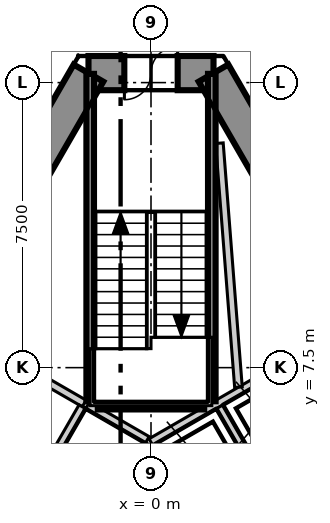
"""IFC4 building model, lengths in metres.
Left out: names, types, materials, properties, quantities, classifications, styles, units other than length and angle.
Written with IfcOpenShell. Run it as: python <this file> out.ifc"""

import sys

from ifc_helpers import new_model, si_unit, direction, frame, frame_2d, origin, place, context, subcontext, project, spatial, polyline, rectangle, outline, extrude, element, fill, save


model = new_model("IFC4")
c1 = context("Model", 3, precision=1e-05, world=origin(), true_north=direction((0.0, 1.0)))
c2 = subcontext(c1, "Body", "Model", "MODEL_VIEW")
j1 = project(units=[si_unit("LENGTHUNIT", "METRE"), si_unit("PLANEANGLEUNIT", "RADIAN")], contexts=[c1])
p1 = place(None, origin())
s1 = spatial("IfcSite", under=j1, at=p1, CompositionType="ELEMENT")
p2 = place(p1, origin())
s2 = spatial("IfcBuilding", under=s1, at=p2, CompositionType="ELEMENT")
p3 = place(p2, frame((0.0, 0.0, 59.3)))
s3 = spatial("IfcBuildingStorey", under=s2, at=p3, CompositionType="ELEMENT", Elevation=59.3)
p4 = place(p3, frame((1.645, 15.25, -0.3), z_axis=(0.0, 0.0, 1.0), x_axis=(-1.0, 0.0, 0.0)))
e1 = element("IfcWall", 1, at=p4, inside=s3, PredefinedType="SHEAR", context=c2, shape_type="SweptSolid", body=[
    extrude(outline(polyline([(-0.26, -0.45), (1.645, -0.45), (3.55, -0.45), (3.031, 0.45), (1.645, 0.45), (0.259, 0.45), (-0.26, -0.45)])), origin(), (0.0, 0.0, 1.0), 4.0),
])
p5 = place(p4, frame((0.945, 0.0, 0.3)))
e2 = element("IfcOpeningElement", 2, at=p5, cuts=e1, PredefinedType="OPENING", context=c2, shape_type="SweptSolid", body=[
    extrude(rectangle(XDim=1.4, YDim=2.1, at=frame_2d((0.7, 1.05))), frame((0.0, 0.46, 0.0), z_axis=(0.0, -1.0, 0.0), x_axis=(1.0, 0.0, 0.0)), (0.0, 0.0, 1.0), 0.92),
])
p6 = place(p3, frame((-1.645, 15.25, -0.3), z_axis=(0.0, 0.0, 1.0), x_axis=(-0.500026485275, -0.866010111964, 0.0)))
e3 = element("IfcWall", 3, at=p6, inside=s3, PredefinedType="SHEAR", context=c2, shape_type="SweptSolid", body=[
    extrude(outline(polyline([(-0.26, -0.45), (1.685, -0.45), (3.63, -0.45), (5.576, -0.45), (7.521, -0.45), (9.466, -0.449), (11.411, -0.449), (13.357, -0.449), (15.302, -0.449), (17.247, -0.449), (19.192, -0.449), (21.138, -0.449), (23.083, -0.449), (25.028, -0.449), (24.509, 0.45), (22.644, 0.45), (20.778, 0.45), (18.913, 0.45), (17.048, 0.45), (15.182, 0.449), (13.317, 0.449), (11.452, 0.449), (9.587, 0.449), (7.721, 0.449), (5.856, 0.449), (3.991, 0.449), (2.125, 0.449), (0.26, 0.449), (-0.26, -0.45)])), origin(), (0.0, 0.0, 1.0), 4.0),
])
p7 = place(p6, frame((11.834, 0.0, 0.3)))
e4 = element("IfcOpeningElement", 4, at=p7, cuts=e3, PredefinedType="OPENING", context=c2, shape_type="SweptSolid", body=[
    extrude(rectangle(XDim=1.1, YDim=2.1, at=frame_2d((0.55, 1.05))), frame((0.0, 0.46, 0.0), z_axis=(0.0, -1.0, 0.0), x_axis=(1.0, 0.0, 0.0)), (0.0, 0.0, 1.0), 0.92),
])
p8 = place(p6, frame((18.976, 0.0, 0.3)))
e5 = element("IfcOpeningElement", 5, at=p8, cuts=e3, PredefinedType="OPENING", context=c2, shape_type="SweptSolid", body=[
    extrude(rectangle(XDim=0.9, YDim=2.1, at=frame_2d((0.45, 1.05))), frame((0.0, 0.46, 0.0), z_axis=(0.0, -1.0, 0.0), x_axis=(1.0, 0.0, 0.0)), (0.0, 0.0, 1.0), 0.92),
])
p9 = place(p6, frame((4.892, 0.0, 0.3)))
e6 = element("IfcOpeningElement", 6, at=p9, cuts=e3, PredefinedType="OPENING", context=c2, shape_type="SweptSolid", body=[
    extrude(rectangle(XDim=0.9, YDim=2.1, at=frame_2d((0.45, 1.05))), frame((0.0, 0.46, 0.0), z_axis=(0.0, -1.0, 0.0), x_axis=(1.0, 0.0, 0.0)), (0.0, 0.0, 1.0), 0.92),
])
p10 = place(p3, frame((14.03, -6.2, -0.3), z_axis=(0.0, 0.0, 1.0), x_axis=(-0.500026485275, 0.866010111964, 0.0)))
e7 = element("IfcWall", 7, at=p10, inside=s3, PredefinedType="SHEAR", context=c2, shape_type="SweptSolid", body=[
    extrude(outline(polyline([(-0.26, -0.449), (1.685, -0.449), (3.63, -0.449), (5.576, -0.449), (7.521, -0.449), (9.466, -0.449), (11.411, -0.449), (13.357, -0.449), (15.302, -0.449), (17.247, -0.45), (19.192, -0.45), (21.138, -0.45), (23.083, -0.45), (25.028, -0.45), (24.509, 0.449), (22.644, 0.449), (20.778, 0.449), (18.913, 0.449), (17.048, 0.449), (15.182, 0.449), (13.317, 0.449), (11.452, 0.449), (9.587, 0.449), (7.721, 0.45), (5.856, 0.45), (3.991, 0.45), (2.125, 0.45), (0.26, 0.45), (-0.26, -0.449)])), origin(), (0.0, 0.0, 1.0), 4.0),
])
p11 = place(p10, frame((11.484, 0.0, 0.3)))
e8 = element("IfcOpeningElement", 8, at=p11, cuts=e7, PredefinedType="OPENING", context=c2, shape_type="SweptSolid", body=[
    extrude(rectangle(XDim=1.8, YDim=2.1, at=frame_2d((0.9, 1.05))), frame((0.0, 0.46, 0.0), z_axis=(0.0, -1.0, 0.0), x_axis=(1.0, 0.0, 0.0)), (0.0, 0.0, 1.0), 0.92),
])
p12 = place(p10, frame((18.914, 0.0, 0.3)))
e9 = element("IfcOpeningElement", 9, at=p12, cuts=e7, PredefinedType="OPENING", context=c2, shape_type="SweptSolid", body=[
    extrude(rectangle(XDim=1.0, YDim=2.1, at=frame_2d((0.5, 1.05))), frame((0.0, 0.46, 0.0), z_axis=(0.0, -1.0, 0.0), x_axis=(1.0, 0.0, 0.0)), (0.0, 0.0, 1.0), 0.92),
])
p13 = place(p3, frame((-19.497, -11.17, 0.0), z_axis=(0.0, 0.0, 1.0), x_axis=(0.499998854553, 0.866026065108, 0.0)))
e10 = element("IfcWall", 10, at=p13, inside=s3, PredefinedType="PARTITIONING", context=c2, shape_type="SweptSolid", body=[
    extrude(rectangle(XDim=38.994, YDim=0.15, at=frame_2d((19.497, 0.0))), origin(), (0.0, 0.0, 1.0), 3.7),
])
p14 = place(p13, frame((36.044, 0.0, 0.0)))
e11 = element("IfcOpeningElement", 11, at=p14, cuts=e10, PredefinedType="OPENING", context=c2, shape_type="SweptSolid", body=[
    extrude(rectangle(XDim=1.1, YDim=2.1, at=frame_2d((0.55, 1.05))), frame((0.0, 0.085, 0.0), z_axis=(0.0, -1.0, 0.0), x_axis=(1.0, 0.0, 0.0)), (0.0, 0.0, 1.0), 0.17),
])
p15 = place(p13, frame((21.855, 0.0, 0.0)))
e12 = element("IfcOpeningElement", 12, at=p15, cuts=e10, PredefinedType="OPENING", context=c2, shape_type="SweptSolid", body=[
    extrude(rectangle(XDim=1.1, YDim=2.1, at=frame_2d((0.55, 1.05))), frame((0.0, 0.085, 0.0), z_axis=(0.0, -1.0, 0.0), x_axis=(1.0, 0.0, 0.0)), (0.0, 0.0, 1.0), 0.17),
])
p16 = place(p13, frame((32.155, 0.0, 0.0)))
e13 = element("IfcOpeningElement", 13, at=p16, cuts=e10, PredefinedType="OPENING", context=c2, shape_type="SweptSolid", body=[
    extrude(rectangle(XDim=0.9, YDim=2.1, at=frame_2d((0.45, 1.05))), frame((0.0, 0.085, 0.0), z_axis=(0.0, -1.0, 0.0), x_axis=(1.0, 0.0, 0.0)), (0.0, 0.0, 1.0), 0.17),
])
p17 = place(p13, frame((28.955, 0.0, 0.0)))
e14 = element("IfcOpeningElement", 14, at=p17, cuts=e10, PredefinedType="OPENING", context=c2, shape_type="SweptSolid", body=[
    extrude(rectangle(XDim=0.9, YDim=2.1, at=frame_2d((0.45, 1.05))), frame((0.0, 0.085, 0.0), z_axis=(0.0, -1.0, 0.0), x_axis=(1.0, 0.0, 0.0)), (0.0, 0.0, 1.0), 0.17),
])
p18 = place(p13, frame((26.055, 0.0, 0.0)))
e15 = element("IfcOpeningElement", 15, at=p18, cuts=e10, PredefinedType="OPENING", context=c2, shape_type="SweptSolid", body=[
    extrude(rectangle(XDim=1.0, YDim=2.1, at=frame_2d((0.5, 1.05))), frame((0.0, 0.085, 0.0), z_axis=(0.0, -1.0, 0.0), x_axis=(1.0, 0.0, 0.0)), (0.0, 0.0, 1.0), 0.17),
])
p19 = place(p13, frame((10.373, 0.0, 0.0)))
e16 = element("IfcOpeningElement", 16, at=p19, cuts=e10, PredefinedType="OPENING", context=c2, shape_type="SweptSolid", body=[
    extrude(rectangle(XDim=1.0, YDim=2.1, at=frame_2d((0.5, 1.05))), frame((0.0, 0.085, 0.0), z_axis=(0.0, -1.0, 0.0), x_axis=(1.0, 0.0, 0.0)), (0.0, 0.0, 1.0), 0.17),
])
p20 = place(p13, frame((17.773, 0.0, 0.0)))
e17 = element("IfcOpeningElement", 17, at=p20, cuts=e10, PredefinedType="OPENING", context=c2, shape_type="SweptSolid", body=[
    extrude(rectangle(XDim=0.9, YDim=2.1, at=frame_2d((0.45, 1.05))), frame((0.0, 0.085, 0.0), z_axis=(0.0, -1.0, 0.0), x_axis=(1.0, 0.0, 0.0)), (0.0, 0.0, 1.0), 0.17),
])
p21 = place(p13, frame((1.689, 0.0, 0.0)))
e18 = element("IfcOpeningElement", 18, at=p21, cuts=e10, PredefinedType="OPENING", context=c2, shape_type="SweptSolid", body=[
    extrude(rectangle(XDim=1.1, YDim=2.1, at=frame_2d((0.55, 1.05))), frame((0.0, 0.085, 0.0), z_axis=(0.0, -1.0, 0.0), x_axis=(1.0, 0.0, 0.0)), (0.0, 0.0, 1.0), 0.17),
])
p22 = place(p3, frame((0.075, 22.47, 0.0), z_axis=(0.0, 0.0, 1.0), x_axis=(0.500002280369, -0.866024087209, 0.0)))
e19 = element("IfcWall", 19, at=p22, inside=s3, PredefinedType="PARTITIONING", context=c2, shape_type="SweptSolid", body=[
    extrude(rectangle(XDim=38.844, YDim=0.15, at=frame_2d((19.422, 0.0))), origin(), (0.0, 0.0, 1.0), 3.7),
])
p23 = place(p22, frame((36.044, 0.0, 0.0)))
e20 = element("IfcOpeningElement", 20, at=p23, cuts=e19, PredefinedType="OPENING", context=c2, shape_type="SweptSolid", body=[
    extrude(rectangle(XDim=1.1, YDim=2.1, at=frame_2d((0.55, 1.05))), frame((0.0, 0.085, 0.0), z_axis=(0.0, -1.0, 0.0), x_axis=(1.0, 0.0, 0.0)), (0.0, 0.0, 1.0), 0.17),
])
p24 = place(p22, frame((26.255, 0.0, 0.0)))
e21 = element("IfcOpeningElement", 21, at=p24, cuts=e19, PredefinedType="OPENING", context=c2, shape_type="SweptSolid", body=[
    extrude(rectangle(XDim=1.1, YDim=2.1, at=frame_2d((0.55, 1.05))), frame((0.0, 0.085, 0.0), z_axis=(0.0, -1.0, 0.0), x_axis=(1.0, 0.0, 0.0)), (0.0, 0.0, 1.0), 0.17),
])
p25 = place(p22, frame((9.173, 0.0, 0.0)))
e22 = element("IfcOpeningElement", 22, at=p25, cuts=e19, PredefinedType="OPENING", context=c2, shape_type="SweptSolid", body=[
    extrude(rectangle(XDim=1.1, YDim=2.1, at=frame_2d((0.55, 1.05))), frame((0.0, 0.085, 0.0), z_axis=(0.0, -1.0, 0.0), x_axis=(1.0, 0.0, 0.0)), (0.0, 0.0, 1.0), 0.17),
])
p26 = place(p22, frame((17.373, 0.0, 0.0)))
e23 = element("IfcOpeningElement", 23, at=p26, cuts=e19, PredefinedType="OPENING", context=c2, shape_type="SweptSolid", body=[
    extrude(rectangle(XDim=0.9, YDim=2.1, at=frame_2d((0.45, 1.05))), frame((0.0, 0.085, 0.0), z_axis=(0.0, -1.0, 0.0), x_axis=(1.0, 0.0, 0.0)), (0.0, 0.0, 1.0), 0.17),
])
p27 = place(p22, frame((14.173, 0.0, 0.0)))
e24 = element("IfcOpeningElement", 24, at=p27, cuts=e19, PredefinedType="OPENING", context=c2, shape_type="SweptSolid", body=[
    extrude(rectangle(XDim=0.9, YDim=2.1, at=frame_2d((0.45, 1.05))), frame((0.0, 0.085, 0.0), z_axis=(0.0, -1.0, 0.0), x_axis=(1.0, 0.0, 0.0)), (0.0, 0.0, 1.0), 0.17),
])
p28 = place(p22, frame((11.273, 0.0, 0.0)))
e25 = element("IfcOpeningElement", 25, at=p28, cuts=e19, PredefinedType="OPENING", context=c2, shape_type="SweptSolid", body=[
    extrude(rectangle(XDim=1.0, YDim=2.1, at=frame_2d((0.5, 1.05))), frame((0.0, 0.085, 0.0), z_axis=(0.0, -1.0, 0.0), x_axis=(1.0, 0.0, 0.0)), (0.0, 0.0, 1.0), 0.17),
])
p29 = place(p22, frame((1.689, 0.0, 0.0)))
e26 = element("IfcOpeningElement", 26, at=p29, cuts=e19, PredefinedType="OPENING", context=c2, shape_type="SweptSolid", body=[
    extrude(rectangle(XDim=1.1, YDim=2.1, at=frame_2d((0.55, 1.05))), frame((0.0, 0.085, 0.0), z_axis=(0.0, -1.0, 0.0), x_axis=(1.0, 0.0, 0.0)), (0.0, 0.0, 1.0), 0.17),
])
p30 = place(p3, frame((-0.002, 5.541, 0.0), z_axis=(0.0, 0.0, 1.0), x_axis=(0.86600155993, 0.500041296494, 0.0)))
e27 = element("IfcWall", 27, at=p30, inside=s3, PredefinedType="SOLIDWALL", context=c2, shape_type="SweptSolid", body=[
    extrude(rectangle(XDim=4.132, YDim=0.2, at=frame_2d((2.066, 0.0))), origin(), (0.0, 0.0, 1.0), 3.7),
])
p31 = place(p3, frame((1.578, 2.874, 0.0), z_axis=(0.0, 0.0, 1.0), x_axis=(0.866031483044, 0.499989470266, 0.0)))
e28 = element("IfcWall", 28, at=p31, inside=s3, PredefinedType="SOLIDWALL", context=c2, shape_type="SweptSolid", body=[
    extrude(rectangle(XDim=6.226, YDim=0.2, at=frame_2d((3.113, 0.0))), origin(), (0.0, 0.0, 1.0), 3.7),
])
p32 = place(p31, frame((2.496, 0.0, 0.0)))
e29 = element("IfcOpeningElement", 29, at=p32, cuts=e28, PredefinedType="OPENING", context=c2, shape_type="SweptSolid", body=[
    extrude(rectangle(XDim=1.1, YDim=2.1, at=frame_2d((0.55, 1.05))), frame((0.0, 0.11, 0.0), z_axis=(0.0, -1.0, 0.0), x_axis=(1.0, 0.0, 0.0)), (0.0, 0.0, 1.0), 0.22),
])
p33 = place(p3, frame((1.807, 6.47, 0.0), z_axis=(0.0, 0.0, 1.0), x_axis=(0.50012328804, -0.865954211699, 0.0)))
e30 = element("IfcWall", 30, at=p33, inside=s3, PredefinedType="SOLIDWALL", context=c2, shape_type="SweptSolid", body=[
    extrude(rectangle(XDim=2.9, YDim=0.2, at=frame_2d((1.45, 0.0))), origin(), (0.0, 0.0, 1.0), 3.7),
])
p34 = place(p3, frame((-3.489, 7.557, 0.0), z_axis=(0.0, 0.0, 1.0), x_axis=(0.866010750942, -0.50002537861, 0.0)))
e31 = element("IfcWall", 31, at=p34, inside=s3, PredefinedType="SOLIDWALL", context=c2, shape_type="SweptSolid", body=[
    extrude(rectangle(XDim=2.0, YDim=0.2, at=frame_2d((1.0, 0.0))), origin(), (0.0, 0.0, 1.0), 3.7),
])
p35 = place(p3, frame((-3.257, 3.959, 0.0), z_axis=(0.0, 0.0, 1.0), x_axis=(0.50012328804, 0.865954211699, 0.0)))
e32 = element("IfcWall", 32, at=p35, inside=s3, PredefinedType="SOLIDWALL", context=c2, shape_type="SweptSolid", body=[
    extrude(rectangle(XDim=2.9, YDim=0.2, at=frame_2d((1.45, 0.0))), origin(), (0.0, 0.0, 1.0), 3.7),
])
p36 = place(p3, frame((-1.67, 6.507, 0.0), z_axis=(0.0, 0.0, 1.0), x_axis=(0.865941441609, -0.500145398563, 0.0)))
e33 = element("IfcWall", 33, at=p36, inside=s3, PredefinedType="SOLIDWALL", context=c2, shape_type="SweptSolid", body=[
    extrude(rectangle(XDim=1.815, YDim=0.2, at=frame_2d((0.908, 0.0))), origin(), (0.0, 0.0, 1.0), 3.7),
])
p37 = place(p3, frame((1.8, 13.406, 0.0), z_axis=(0.0, 0.0, 1.0), x_axis=(0.077809933421, -0.996968211259, 0.0)))
e34 = element("IfcWall", 34, at=p37, inside=s3, PredefinedType="SOLIDWALL", context=c2, shape_type="SweptSolid", body=[
    extrude(rectangle(XDim=6.438, YDim=0.2, at=frame_2d((3.219, 0.0))), origin(), (0.0, 0.0, 1.0), 3.7),
])
p38 = place(p3, frame((1.6, 6.615, 0.0), z_axis=(0.0, 0.0, 1.0), x_axis=(0.0, 1.0, 0.0)))
e35 = element("IfcWall", 35, at=p38, inside=s3, PredefinedType="SOLIDWALL", context=c2, shape_type="SweptSolid", body=[
    extrude(rectangle(XDim=8.615, YDim=0.2, at=frame_2d((4.308, 0.0))), origin(), (0.0, 0.0, 1.0), 3.7),
])
p39 = place(p3, frame((-1.4, 6.5, 0.0), z_axis=(0.0, 0.0, 1.0), x_axis=(1.0, 0.0, 0.0)))
e36 = element("IfcWall", 36, at=p39, inside=s3, PredefinedType="SOLIDWALL", context=c2, shape_type="SweptSolid", body=[
    extrude(rectangle(XDim=2.8, YDim=0.2, at=frame_2d((1.4, 0.0))), origin(), (0.0, 0.0, 1.0), 3.7),
])
p40 = place(p3, frame((-1.6, 6.615, 0.0), z_axis=(0.0, 0.0, 1.0), x_axis=(0.0, 1.0, 0.0)))
e37 = element("IfcWall", 37, at=p40, inside=s3, PredefinedType="SOLIDWALL", context=c2, shape_type="SweptSolid", body=[
    extrude(rectangle(XDim=8.615, YDim=0.2, at=frame_2d((4.308, 0.0))), origin(), (0.0, 0.0, 1.0), 3.7),
])
p41 = place(p5, origin())
e38 = element("IfcDoor", 38, at=p41, inside=s3, OperationType="DOUBLE_DOOR_SINGLE_SWING", PredefinedType="DOOR", context=c2, shape_type="SweptSolid", body=[
    extrude(rectangle(XDim=1.4, YDim=2.1, at=frame_2d((0.7, 1.05))), frame((0.0, 0.025, 0.0), z_axis=(0.0, -1.0, 0.0), x_axis=(1.0, 0.0, 0.0)), (0.0, 0.0, 1.0), 0.05),
])
fill(e2, e38)
save(model, sys.argv[1])
